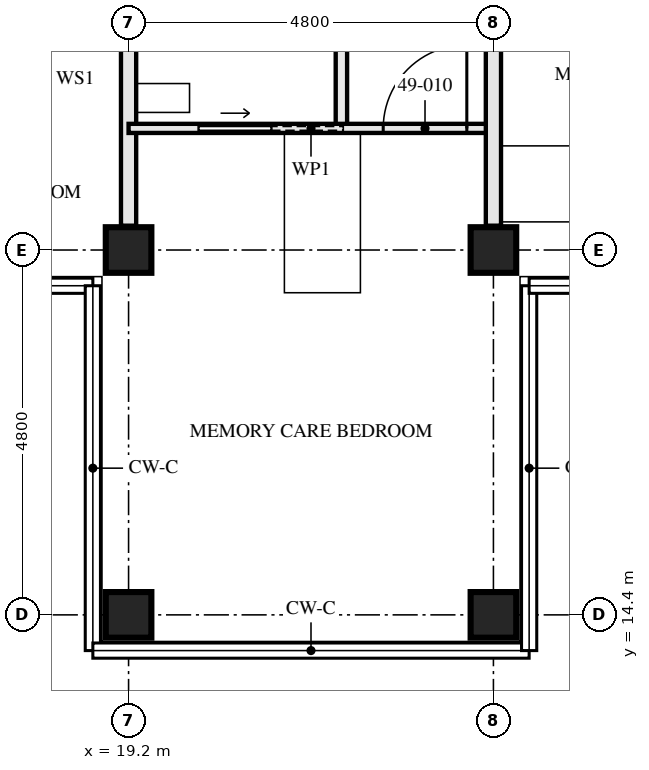
"""IFC4 building model, lengths in metres.
Left out: names, types, materials, properties, quantities, classifications, styles, units other than length and angle.
Written with IfcOpenShell. Run it as: python <this file> out.ifc"""

import sys

from ifc_helpers import new_model, si_unit, direction, frame, frame_2d, origin, origin_2d, place, context, subcontext, project, spatial, rectangle, hollow_rectangle, extrude, element, fill, save


model = new_model("IFC4")
c1 = context("Model", 3, precision=1e-05, world=origin(), true_north=direction((0.0, 1.0)))
c2 = subcontext(c1, "Body", "Model", "MODEL_VIEW")
j1 = project(units=[si_unit("LENGTHUNIT", "METRE"), si_unit("PLANEANGLEUNIT", "RADIAN")], contexts=[c1])
p1 = place(None, origin())
s1 = spatial("IfcSite", under=j1, at=p1, CompositionType="ELEMENT")
p2 = place(p1, origin())
s2 = spatial("IfcBuilding", under=s1, at=p2, CompositionType="ELEMENT")
p3 = place(p2, frame((0.0, 0.0, 179.5)))
s3 = spatial("IfcBuildingStorey", under=s2, at=p3, CompositionType="ELEMENT", Elevation=179.5)
for number, where, z_axis, x_axis in (
    (1, (19.2, 14.4, 0.0), (0.0, 0.0, 1.0), (0.0, 1.0, 0.0)),
    (2, (19.2, 19.2, 0.0), (0.0, 0.0, 1.0), (0.0, 1.0, 0.0)),
    (3, (24.0, 14.4, 0.0), (0.0, 0.0, 1.0), (0.0, 1.0, 0.0)),
    (4, (24.0, 19.2, 0.0), (0.0, 0.0, 1.0), (0.0, 1.0, 0.0)),
):
    element("IfcColumn", number, at=place(p3, frame(where, z_axis=z_axis, x_axis=x_axis)), inside=s3, PredefinedType="COLUMN", context=c2, shape_type="SweptSolid", body=[
        extrude(hollow_rectangle(XDim=0.6, YDim=0.6, WallThickness=0.08, at=origin_2d()), origin(), (0.0, 0.0, 1.0), 3.5),
    ])
p4 = place(p3, frame((19.2, 19.52, 0.0), z_axis=(0.0, 0.0, 1.0), x_axis=(0.0, 1.0, 0.0)))
e5 = element("IfcWall", 5, at=p4, inside=s3, PredefinedType="PARTITIONING", context=c2, shape_type="SweptSolid", body=[
    extrude(rectangle(XDim=7.28, YDim=0.2, at=frame_2d((3.64, 0.0))), origin(), (0.0, 0.0, 1.0), 2.55),
])
p5 = place(p3, frame((22.0, 20.8, 0.0), z_axis=(0.0, 0.0, 1.0), x_axis=(0.0, 1.0, 0.0)))
e6 = element("IfcWall", 6, at=p5, inside=s3, PredefinedType="PARTITIONING", context=c2, shape_type="SweptSolid", body=[
    extrude(rectangle(XDim=3.0, YDim=0.15, at=frame_2d((1.5, 0.0))), origin(), (0.0, 0.0, 1.0), 3.33),
])
p6 = place(p3, frame((19.2, 20.8, 0.0), z_axis=(0.0, 0.0, 1.0), x_axis=(1.0, 0.0, 0.0)))
e7 = element("IfcWall", 7, at=p6, inside=s3, PredefinedType="PARTITIONING", context=c2, shape_type="SweptSolid", body=[
    extrude(rectangle(XDim=4.8, YDim=0.12, at=frame_2d((2.4, 0.0))), origin(), (0.0, 0.0, 1.0), 3.33),
])
p7 = place(p6, frame((3.35, 0.0, 0.0)))
e8 = element("IfcOpeningElement", 8, at=p7, cuts=e7, PredefinedType="OPENING", context=c2, shape_type="SweptSolid", body=[
    extrude(rectangle(XDim=1.1, YDim=2.1, at=frame_2d((0.55, 1.05))), frame((0.0, 0.071, 0.0), z_axis=(0.0, -1.0, 0.0), x_axis=(1.0, 0.0, 0.0)), (0.0, 0.0, 1.0), 0.141),
])
p8 = place(p6, frame((0.925, 0.0, 0.0)))
e9 = element("IfcOpeningElement", 9, at=p8, cuts=e7, PredefinedType="OPENING", context=c2, shape_type="SweptSolid", body=[
    extrude(rectangle(XDim=0.95, YDim=2.1, at=frame_2d((0.475, 1.05))), frame((0.0, 0.071, 0.0), z_axis=(0.0, -1.0, 0.0), x_axis=(1.0, 0.0, 0.0)), (0.0, 0.0, 1.0), 0.141),
])
p9 = place(p3, frame((24.0, 19.52, 0.0), z_axis=(0.0, 0.0, 1.0), x_axis=(0.0, 1.0, 0.0)))
e10 = element("IfcWall", 10, at=p9, inside=s3, PredefinedType="PARTITIONING", context=c2, shape_type="SweptSolid", body=[
    extrude(rectangle(XDim=7.28, YDim=0.2, at=frame_2d((3.64, 0.0))), origin(), (0.0, 0.0, 1.0), 2.55),
])
p10 = place(p7, origin())
e11 = element("IfcDoor", 11, at=p10, inside=s3, OperationType="SINGLE_SWING_LEFT", PredefinedType="DOOR", context=c2, shape_type="SweptSolid", body=[
    extrude(rectangle(XDim=1.1, YDim=2.1, at=frame_2d((0.55, 1.05))), frame((0.0, 0.022, 0.0), z_axis=(0.0, -1.0, 0.0), x_axis=(1.0, 0.0, 0.0)), (0.0, 0.0, 1.0), 0.044),
])
fill(e8, e11)
p11 = place(p8, origin())
e12 = element("IfcDoor", 12, at=p11, inside=s3, OperationType="SLIDING_TO_LEFT", PredefinedType="DOOR", context=c2, shape_type="SweptSolid", body=[
    extrude(rectangle(XDim=0.95, YDim=2.1, at=frame_2d((0.475, 1.05))), frame((0.0, 0.022, 0.0), z_axis=(0.0, -1.0, 0.0), x_axis=(1.0, 0.0, 0.0)), (0.0, 0.0, 1.0), 0.044),
])
fill(e9, e12)
save(model, sys.argv[1])
